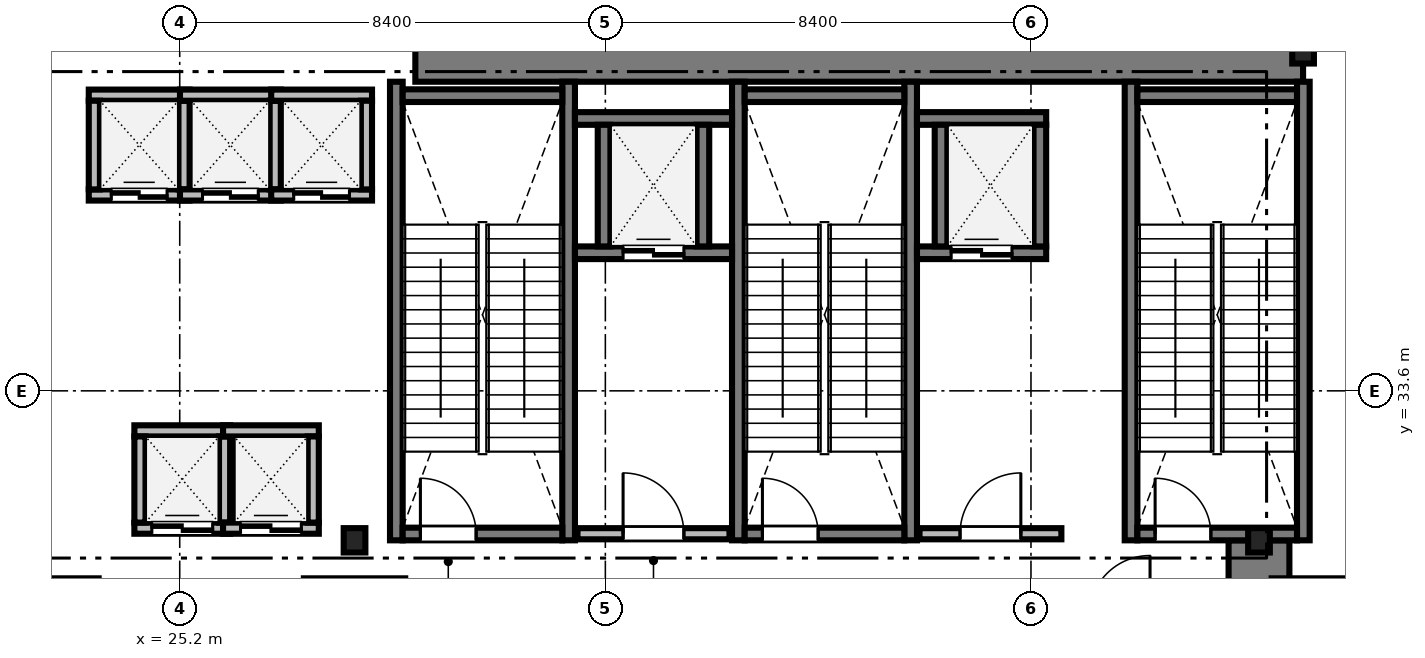
"""IFC4 building model, lengths in metres.
Left out: names, types, materials, properties, quantities, classifications, styles, units other than length and angle.
Written with IfcOpenShell. Run it as: python <this file> out.ifc"""

import sys

from ifc_helpers import new_model, si_unit, direction, frame, frame_2d, origin, origin_2d, place, context, subcontext, project, spatial, rectangle, i_section, extrude, source, transform, mapped, element, fill, save


model = new_model("IFC4")
c1 = context("Model", 3, precision=1e-05, world=origin(), true_north=direction((0.0, 1.0)))
c2 = subcontext(c1, "Body", "Model", "MODEL_VIEW")
j1 = project(units=[si_unit("LENGTHUNIT", "METRE"), si_unit("PLANEANGLEUNIT", "RADIAN")], contexts=[c1])
p1 = place(None, origin())
s1 = spatial("IfcSite", under=j1, at=p1, CompositionType="ELEMENT")
p2 = place(p1, origin())
s2 = spatial("IfcBuilding", under=s1, at=p2, CompositionType="ELEMENT")
p3 = place(p2, origin())
s3 = spatial("IfcBuildingStorey", under=s2, at=p3, CompositionType="ELEMENT", Elevation=0.0)
m1 = source(origin(), c2, "Body", "SweptSolid", [
    extrude(rectangle(XDim=17.52, YDim=1.2, at=frame_2d((8.76, 0.0))), origin(), (0.0, 0.0, 1.0), 5.68),
])
p4 = place(p3, frame((29.85, 40.3, 0.0), z_axis=(0.0, 0.0, 1.0), x_axis=(1.0, 0.0, 0.0)))
e1 = element("IfcWall", 1, at=p4, inside=s3, PredefinedType="SHEAR", context=c2, shape_type="MappedRepresentation", body=[
    mapped(m1, transform((0.0, 0.0, 0.0), scale=1.0)),
])
m2 = source(origin(), c2, "Body", "SweptSolid", [
    extrude(rectangle(XDim=13.15, YDim=1.2, at=frame_2d((6.575, 0.0))), origin(), (0.0, 0.0, 1.0), 5.68),
])
p5 = place(p3, frame((46.5, 17.5, 0.0), z_axis=(0.0, 0.0, 1.0), x_axis=(0.0, 1.0, 0.0)))
e2 = element("IfcWall", 2, at=p5, inside=s3, PredefinedType="SHEAR", context=c2, shape_type="MappedRepresentation", body=[
    mapped(m2, transform((0.0, 0.0, 0.0), scale=1.0)),
])
m3 = source(origin(), c2, "Body", "SweptSolid", [
    extrude(i_section(OverallWidth=0.428, OverallDepth=0.481, WebThickness=0.04, FlangeThickness=0.063, FilletRadius=0.015, at=origin_2d()), origin(), (0.0, 0.0, 1.0), 5.68),
])
for number, where, z_axis, x_axis in (
    (3, (28.65, 30.65, 0.0), (0.0, 0.0, 1.0), (1.0, 0.0, 0.0)),
    (4, (46.5, 30.65, 0.0), (0.0, 0.0, 1.0), (1.0, 0.0, 0.0)),
    (5, (47.37, 40.3, 0.0), (0.0, 0.0, 1.0), (1.0, 0.0, 0.0)),
):
    element("IfcColumn", number, at=place(p3, frame(where, z_axis=z_axis, x_axis=x_axis)), inside=s3, PredefinedType="COLUMN", context=c2, shape_type="MappedRepresentation", body=[
        mapped(m3, transform((0.0, 0.0, 0.0), scale=1.0)),
    ])
m4 = source(origin(), c2, "Body", "SweptSolid", [
    extrude(rectangle(XDim=9.05, YDim=0.25, at=frame_2d((4.525, 0.0))), origin(), (0.0, 0.0, 1.0), 5.8),
])
for number, where, z_axis, x_axis in (
    (6, (29.475, 30.65, 0.0), (0.0, 0.0, 1.0), (0.0, 1.0, 0.0)),
    (7, (32.875, 30.65, 0.0), (0.0, 0.0, 1.0), (0.0, 1.0, 0.0)),
):
    element("IfcWall", number, at=place(p3, frame(where, z_axis=z_axis, x_axis=x_axis)), inside=s3, PredefinedType="SOLIDWALL", context=c2, shape_type="MappedRepresentation", body=[
        mapped(m4, transform((0.0, 0.0, 0.0), scale=1.0)),
    ])
m5 = source(origin(), c2, "Body", "SweptSolid", [
    extrude(rectangle(XDim=3.15, YDim=0.25, at=frame_2d((1.575, 0.0))), origin(), (0.0, 0.0, 1.0), 5.8),
])
p6 = place(p3, frame((29.6, 39.425, 0.0), z_axis=(0.0, 0.0, 1.0), x_axis=(1.0, 0.0, 0.0)))
e8 = element("IfcWall", 8, at=p6, inside=s3, PredefinedType="SOLIDWALL", context=c2, shape_type="MappedRepresentation", body=[
    mapped(m5, transform((0.0, 0.0, 0.0), scale=1.0)),
])
p7 = place(p3, frame((29.6, 30.775, 0.0), z_axis=(0.0, 0.0, 1.0), x_axis=(1.0, 0.0, 0.0)))
e9 = element("IfcWall", 9, at=p7, inside=s3, PredefinedType="SOLIDWALL", context=c2, shape_type="MappedRepresentation", body=[
    mapped(m5, transform((0.0, 0.0, 0.0), scale=1.0)),
])
m6 = source(origin(), c2, "Body", "SweptSolid", [
    extrude(rectangle(XDim=1.1, YDim=2.2, at=frame_2d((0.55, 1.1))), frame((0.0, 0.135, 0.0), z_axis=(0.0, -1.0, 0.0), x_axis=(1.0, 0.0, 0.0)), (0.0, 0.0, 1.0), 0.27),
])
p8 = place(p7, frame((0.35, 0.0, 0.0)))
e10 = element("IfcOpeningElement", 10, at=p8, cuts=e9, PredefinedType="OPENING", context=c2, shape_type="MappedRepresentation", body=[
    mapped(m6, transform((0.0, 0.0, 0.0), scale=1.0)),
])
for number, where, z_axis, x_axis in (
    (11, (36.225, 30.65, 0.0), (0.0, 0.0, 1.0), (0.0, 1.0, 0.0)),
    (12, (39.625, 30.65, 0.0), (0.0, 0.0, 1.0), (0.0, 1.0, 0.0)),
):
    element("IfcWall", number, at=place(p3, frame(where, z_axis=z_axis, x_axis=x_axis)), inside=s3, PredefinedType="SOLIDWALL", context=c2, shape_type="MappedRepresentation", body=[
        mapped(m4, transform((0.0, 0.0, 0.0), scale=1.0)),
    ])
p9 = place(p3, frame((36.35, 39.425, 0.0), z_axis=(0.0, 0.0, 1.0), x_axis=(1.0, 0.0, 0.0)))
e13 = element("IfcWall", 13, at=p9, inside=s3, PredefinedType="SOLIDWALL", context=c2, shape_type="MappedRepresentation", body=[
    mapped(m5, transform((0.0, 0.0, 0.0), scale=1.0)),
])
p10 = place(p3, frame((36.35, 30.775, 0.0), z_axis=(0.0, 0.0, 1.0), x_axis=(1.0, 0.0, 0.0)))
e14 = element("IfcWall", 14, at=p10, inside=s3, PredefinedType="SOLIDWALL", context=c2, shape_type="MappedRepresentation", body=[
    mapped(m5, transform((0.0, 0.0, 0.0), scale=1.0)),
])
p11 = place(p10, frame((0.35, 0.0, 0.0)))
e15 = element("IfcOpeningElement", 15, at=p11, cuts=e14, PredefinedType="OPENING", context=c2, shape_type="MappedRepresentation", body=[
    mapped(m6, transform((0.0, 0.0, 0.0), scale=1.0)),
])
for number, where, z_axis, x_axis in (
    (16, (43.975, 30.65, 0.0), (0.0, 0.0, 1.0), (0.0, 1.0, 0.0)),
    (17, (47.375, 30.65, 0.0), (0.0, 0.0, 1.0), (0.0, 1.0, 0.0)),
):
    element("IfcWall", number, at=place(p3, frame(where, z_axis=z_axis, x_axis=x_axis)), inside=s3, PredefinedType="SOLIDWALL", context=c2, shape_type="MappedRepresentation", body=[
        mapped(m4, transform((0.0, 0.0, 0.0), scale=1.0)),
    ])
p12 = place(p3, frame((44.1, 39.425, 0.0), z_axis=(0.0, 0.0, 1.0), x_axis=(1.0, 0.0, 0.0)))
e18 = element("IfcWall", 18, at=p12, inside=s3, PredefinedType="SOLIDWALL", context=c2, shape_type="MappedRepresentation", body=[
    mapped(m5, transform((0.0, 0.0, 0.0), scale=1.0)),
])
p13 = place(p3, frame((44.1, 30.775, 0.0), z_axis=(0.0, 0.0, 1.0), x_axis=(1.0, 0.0, 0.0)))
e19 = element("IfcWall", 19, at=p13, inside=s3, PredefinedType="SOLIDWALL", context=c2, shape_type="MappedRepresentation", body=[
    mapped(m5, transform((0.0, 0.0, 0.0), scale=1.0)),
])
p14 = place(p13, frame((0.35, 0.0, 0.0)))
e20 = element("IfcOpeningElement", 20, at=p14, cuts=e19, PredefinedType="OPENING", context=c2, shape_type="MappedRepresentation", body=[
    mapped(m6, transform((0.0, 0.0, 0.0), scale=1.0)),
])
m7 = source(origin(), c2, "Body", "SweptSolid", [
    extrude(rectangle(XDim=3.0, YDim=0.22, at=frame_2d((1.5, 0.0))), origin(), (0.0, 0.0, 1.0), 5.68),
])
p15 = place(p3, frame((33.05, 30.78, 0.0), z_axis=(0.0, 0.0, 1.0), x_axis=(1.0, 0.0, 0.0)))
e21 = element("IfcWall", 21, at=p15, inside=s3, PredefinedType="SOLIDWALL", context=c2, shape_type="MappedRepresentation", body=[
    mapped(m7, transform((0.0, 0.0, 0.0), scale=1.0)),
])
m8 = source(origin(), c2, "Body", "SweptSolid", [
    extrude(rectangle(XDim=1.2, YDim=2.2, at=frame_2d((0.6, 1.1))), frame((0.0, 0.12, 0.0), z_axis=(0.0, -1.0, 0.0), x_axis=(1.0, 0.0, 0.0)), (0.0, 0.0, 1.0), 0.24),
])
p16 = place(p15, frame((0.9, 0.0, 0.0)))
e22 = element("IfcOpeningElement", 22, at=p16, cuts=e21, PredefinedType="OPENING", context=c2, shape_type="MappedRepresentation", body=[
    mapped(m8, transform((0.0, 0.0, 0.0), scale=1.0)),
])
m9 = source(origin(), c2, "Body", "SweptSolid", [
    extrude(rectangle(XDim=2.8, YDim=0.22, at=frame_2d((1.4, 0.0))), origin(), (0.0, 0.0, 1.0), 5.68),
])
p17 = place(p3, frame((39.8, 30.78, 0.0), z_axis=(0.0, 0.0, 1.0), x_axis=(1.0, 0.0, 0.0)))
e23 = element("IfcWall", 23, at=p17, inside=s3, PredefinedType="SOLIDWALL", context=c2, shape_type="MappedRepresentation", body=[
    mapped(m9, transform((0.0, 0.0, 0.0), scale=1.0)),
])
p18 = place(p17, frame((0.8, 0.0, 0.0)))
e24 = element("IfcOpeningElement", 24, at=p18, cuts=e23, PredefinedType="OPENING", context=c2, shape_type="MappedRepresentation", body=[
    mapped(m8, transform((0.0, 0.0, 0.0), scale=1.0)),
])
m10 = source(origin(), c2, "Body", "SweptSolid", [
    extrude(rectangle(XDim=1.99, YDim=0.22, at=frame_2d((0.995, 0.0))), origin(), (0.0, 0.0, 1.0), 5.68),
])
p19 = place(p3, frame((23.405, 37.465, 0.0), z_axis=(0.0, 0.0, 1.0), x_axis=(1.0, 0.0, 0.0)))
e25 = element("IfcWall", 25, at=p19, inside=s3, PredefinedType="SOLIDWALL", context=c2, shape_type="MappedRepresentation", body=[
    mapped(m10, transform((0.0, 0.0, 0.0), scale=1.0)),
])
m11 = source(origin(), c2, "Body", "SweptSolid", [
    extrude(rectangle(XDim=1.1, YDim=2.2, at=frame_2d((0.55, 1.1))), frame((0.0, 0.12, 0.0), z_axis=(0.0, -1.0, 0.0), x_axis=(1.0, 0.0, 0.0)), (0.0, 0.0, 1.0), 0.24),
])
p20 = place(p19, frame((0.445, 0.0, 0.0)))
e26 = element("IfcOpeningElement", 26, at=p20, cuts=e25, PredefinedType="OPENING", context=c2, shape_type="MappedRepresentation", body=[
    mapped(m11, transform((0.0, 0.0, 0.0), scale=1.0)),
])
p21 = place(p3, frame((23.405, 39.435, 0.0), z_axis=(0.0, 0.0, 1.0), x_axis=(1.0, 0.0, 0.0)))
e27 = element("IfcWall", 27, at=p21, inside=s3, PredefinedType="SOLIDWALL", context=c2, shape_type="MappedRepresentation", body=[
    mapped(m10, transform((0.0, 0.0, 0.0), scale=1.0)),
])
m12 = source(origin(), c2, "Body", "SweptSolid", [
    extrude(rectangle(XDim=1.75, YDim=0.22, at=frame_2d((0.875, 0.0))), origin(), (0.0, 0.0, 1.0), 5.68),
])
for number, where, z_axis, x_axis in (
    (28, (23.515, 37.575, 0.0), (0.0, 0.0, 1.0), (0.0, 1.0, 0.0)),
    (29, (25.285, 37.575, 0.0), (0.0, 0.0, 1.0), (0.0, 1.0, 0.0)),
):
    element("IfcWall", number, at=place(p3, frame(where, z_axis=z_axis, x_axis=x_axis)), inside=s3, PredefinedType="SOLIDWALL", context=c2, shape_type="MappedRepresentation", body=[
        mapped(m12, transform((0.0, 0.0, 0.0), scale=1.0)),
    ])
p22 = place(p3, frame((25.205, 37.465, 0.0), z_axis=(0.0, 0.0, 1.0), x_axis=(1.0, 0.0, 0.0)))
e30 = element("IfcWall", 30, at=p22, inside=s3, PredefinedType="SOLIDWALL", context=c2, shape_type="MappedRepresentation", body=[
    mapped(m10, transform((0.0, 0.0, 0.0), scale=1.0)),
])
p23 = place(p22, frame((0.445, 0.0, 0.0)))
e31 = element("IfcOpeningElement", 31, at=p23, cuts=e30, PredefinedType="OPENING", context=c2, shape_type="MappedRepresentation", body=[
    mapped(m11, transform((0.0, 0.0, 0.0), scale=1.0)),
])
p24 = place(p3, frame((25.205, 39.435, 0.0), z_axis=(0.0, 0.0, 1.0), x_axis=(1.0, 0.0, 0.0)))
e32 = element("IfcWall", 32, at=p24, inside=s3, PredefinedType="SOLIDWALL", context=c2, shape_type="MappedRepresentation", body=[
    mapped(m10, transform((0.0, 0.0, 0.0), scale=1.0)),
])
p25 = place(p3, frame((27.085, 37.575, 0.0), z_axis=(0.0, 0.0, 1.0), x_axis=(0.0, 1.0, 0.0)))
e33 = element("IfcWall", 33, at=p25, inside=s3, PredefinedType="SOLIDWALL", context=c2, shape_type="MappedRepresentation", body=[
    mapped(m12, transform((0.0, 0.0, 0.0), scale=1.0)),
])
m13 = source(origin(), c2, "Body", "SweptSolid", [
    extrude(rectangle(XDim=1.99, YDim=0.22, at=frame_2d((0.995, 0.0))), origin(), (0.0, 0.0, 1.0), 5.68),
])
p26 = place(p3, frame((27.005, 37.465, 0.0), z_axis=(0.0, 0.0, 1.0), x_axis=(1.0, 0.0, 0.0)))
e34 = element("IfcWall", 34, at=p26, inside=s3, PredefinedType="SOLIDWALL", context=c2, shape_type="MappedRepresentation", body=[
    mapped(m13, transform((0.0, 0.0, 0.0), scale=1.0)),
])
p27 = place(p26, frame((0.445, 0.0, 0.0)))
e35 = element("IfcOpeningElement", 35, at=p27, cuts=e34, PredefinedType="OPENING", context=c2, shape_type="MappedRepresentation", body=[
    mapped(m11, transform((0.0, 0.0, 0.0), scale=1.0)),
])
p28 = place(p3, frame((27.005, 39.435, 0.0), z_axis=(0.0, 0.0, 1.0), x_axis=(1.0, 0.0, 0.0)))
e36 = element("IfcWall", 36, at=p28, inside=s3, PredefinedType="SOLIDWALL", context=c2, shape_type="MappedRepresentation", body=[
    mapped(m13, transform((0.0, 0.0, 0.0), scale=1.0)),
])
p29 = place(p3, frame((28.885, 37.575, 0.0), z_axis=(0.0, 0.0, 1.0), x_axis=(0.0, 1.0, 0.0)))
e37 = element("IfcWall", 37, at=p29, inside=s3, PredefinedType="SOLIDWALL", context=c2, shape_type="MappedRepresentation", body=[
    mapped(m12, transform((0.0, 0.0, 0.0), scale=1.0)),
])
m14 = source(origin(), c2, "Body", "SweptSolid", [
    extrude(rectangle(XDim=3.1, YDim=0.25, at=frame_2d((1.55, 0.0))), origin(), (0.0, 0.0, 1.0), 5.68),
])
p30 = place(p3, frame((33.0, 36.325, 0.0), z_axis=(0.0, 0.0, 1.0), x_axis=(1.0, 0.0, 0.0)))
e38 = element("IfcWall", 38, at=p30, inside=s3, PredefinedType="SOLIDWALL", context=c2, shape_type="MappedRepresentation", body=[
    mapped(m14, transform((0.0, 0.0, 0.0), scale=1.0)),
])
m15 = source(origin(), c2, "Body", "SweptSolid", [
    extrude(rectangle(XDim=1.2, YDim=2.25, at=frame_2d((0.6, 1.125))), frame((0.0, 0.135, 0.0), z_axis=(0.0, -1.0, 0.0), x_axis=(1.0, 0.0, 0.0)), (0.0, 0.0, 1.0), 0.27),
])
p31 = place(p30, frame((0.95, 0.0, 0.0)))
e39 = element("IfcOpeningElement", 39, at=p31, cuts=e38, PredefinedType="OPENING", context=c2, shape_type="MappedRepresentation", body=[
    mapped(m15, transform((0.0, 0.0, 0.0), scale=1.0)),
])
p32 = place(p3, frame((33.0, 38.975, 0.0), z_axis=(0.0, 0.0, 1.0), x_axis=(1.0, 0.0, 0.0)))
e40 = element("IfcWall", 40, at=p32, inside=s3, PredefinedType="SOLIDWALL", context=c2, shape_type="MappedRepresentation", body=[
    mapped(m14, transform((0.0, 0.0, 0.0), scale=1.0)),
])
m16 = source(origin(), c2, "Body", "SweptSolid", [
    extrude(rectangle(XDim=2.4, YDim=0.25, at=frame_2d((1.2, 0.0))), origin(), (0.0, 0.0, 1.0), 5.68),
])
for number, where, z_axis, x_axis in (
    (41, (33.575, 36.45, 0.0), (0.0, 0.0, 1.0), (0.0, 1.0, 0.0)),
    (42, (35.525, 36.45, 0.0), (0.0, 0.0, 1.0), (0.0, 1.0, 0.0)),
):
    element("IfcWall", number, at=place(p3, frame(where, z_axis=z_axis, x_axis=x_axis)), inside=s3, PredefinedType="SOLIDWALL", context=c2, shape_type="MappedRepresentation", body=[
        mapped(m16, transform((0.0, 0.0, 0.0), scale=1.0)),
    ])
m17 = source(origin(), c2, "Body", "SweptSolid", [
    extrude(rectangle(XDim=2.55, YDim=0.25, at=frame_2d((1.275, 0.0))), origin(), (0.0, 0.0, 1.0), 5.68),
])
p33 = place(p3, frame((39.75, 36.325, 0.0), z_axis=(0.0, 0.0, 1.0), x_axis=(1.0, 0.0, 0.0)))
e43 = element("IfcWall", 43, at=p33, inside=s3, PredefinedType="SOLIDWALL", context=c2, shape_type="MappedRepresentation", body=[
    mapped(m17, transform((0.0, 0.0, 0.0), scale=1.0)),
])
p34 = place(p33, frame((0.675, 0.0, 0.0)))
e44 = element("IfcOpeningElement", 44, at=p34, cuts=e43, PredefinedType="OPENING", context=c2, shape_type="MappedRepresentation", body=[
    mapped(m15, transform((0.0, 0.0, 0.0), scale=1.0)),
])
p35 = place(p3, frame((39.75, 38.975, 0.0), z_axis=(0.0, 0.0, 1.0), x_axis=(1.0, 0.0, 0.0)))
e45 = element("IfcWall", 45, at=p35, inside=s3, PredefinedType="SOLIDWALL", context=c2, shape_type="MappedRepresentation", body=[
    mapped(m17, transform((0.0, 0.0, 0.0), scale=1.0)),
])
for number, where, z_axis, x_axis in (
    (46, (40.225, 36.45, 0.0), (0.0, 0.0, 1.0), (0.0, 1.0, 0.0)),
    (47, (42.175, 36.45, 0.0), (0.0, 0.0, 1.0), (0.0, 1.0, 0.0)),
):
    element("IfcWall", number, at=place(p3, frame(where, z_axis=z_axis, x_axis=x_axis)), inside=s3, PredefinedType="SOLIDWALL", context=c2, shape_type="MappedRepresentation", body=[
        mapped(m16, transform((0.0, 0.0, 0.0), scale=1.0)),
    ])
m18 = source(origin(), c2, "Body", "SweptSolid", [
    extrude(rectangle(XDim=1.89, YDim=0.22, at=frame_2d((0.945, 0.0))), origin(), (0.0, 0.0, 1.0), 5.68),
])
p36 = place(p3, frame((24.305, 30.89, 0.0), z_axis=(0.0, 0.0, 1.0), x_axis=(1.0, 0.0, 0.0)))
e48 = element("IfcWall", 48, at=p36, inside=s3, PredefinedType="SOLIDWALL", context=c2, shape_type="MappedRepresentation", body=[
    mapped(m18, transform((0.0, 0.0, 0.0), scale=1.0)),
])
m19 = source(origin(), c2, "Body", "SweptSolid", [
    extrude(rectangle(XDim=1.2, YDim=2.25, at=frame_2d((0.6, 1.125))), frame((0.0, 0.12, 0.0), z_axis=(0.0, -1.0, 0.0), x_axis=(1.0, 0.0, 0.0)), (0.0, 0.0, 1.0), 0.24),
])
p37 = place(p36, frame((0.345, 0.0, 0.0)))
e49 = element("IfcOpeningElement", 49, at=p37, cuts=e48, PredefinedType="OPENING", context=c2, shape_type="MappedRepresentation", body=[
    mapped(m19, transform((0.0, 0.0, 0.0), scale=1.0)),
])
p38 = place(p3, frame((24.305, 32.81, 0.0), z_axis=(0.0, 0.0, 1.0), x_axis=(1.0, 0.0, 0.0)))
e50 = element("IfcWall", 50, at=p38, inside=s3, PredefinedType="SOLIDWALL", context=c2, shape_type="MappedRepresentation", body=[
    mapped(m18, transform((0.0, 0.0, 0.0), scale=1.0)),
])
m20 = source(origin(), c2, "Body", "SweptSolid", [
    extrude(rectangle(XDim=1.7, YDim=0.22, at=frame_2d((0.85, 0.0))), origin(), (0.0, 0.0, 1.0), 5.68),
])
for number, where, z_axis, x_axis in (
    (51, (24.415, 31.0, 0.0), (0.0, 0.0, 1.0), (0.0, 1.0, 0.0)),
    (52, (26.085, 31.0, 0.0), (0.0, 0.0, 1.0), (0.0, 1.0, 0.0)),
):
    element("IfcWall", number, at=place(p3, frame(where, z_axis=z_axis, x_axis=x_axis)), inside=s3, PredefinedType="SOLIDWALL", context=c2, shape_type="MappedRepresentation", body=[
        mapped(m20, transform((0.0, 0.0, 0.0), scale=1.0)),
    ])
p39 = place(p3, frame((26.055, 30.89, 0.0), z_axis=(0.0, 0.0, 1.0), x_axis=(1.0, 0.0, 0.0)))
e53 = element("IfcWall", 53, at=p39, inside=s3, PredefinedType="SOLIDWALL", context=c2, shape_type="MappedRepresentation", body=[
    mapped(m18, transform((0.0, 0.0, 0.0), scale=1.0)),
])
p40 = place(p39, frame((0.345, 0.0, 0.0)))
e54 = element("IfcOpeningElement", 54, at=p40, cuts=e53, PredefinedType="OPENING", context=c2, shape_type="MappedRepresentation", body=[
    mapped(m19, transform((0.0, 0.0, 0.0), scale=1.0)),
])
p41 = place(p3, frame((26.055, 32.81, 0.0), z_axis=(0.0, 0.0, 1.0), x_axis=(1.0, 0.0, 0.0)))
e55 = element("IfcWall", 55, at=p41, inside=s3, PredefinedType="SOLIDWALL", context=c2, shape_type="MappedRepresentation", body=[
    mapped(m18, transform((0.0, 0.0, 0.0), scale=1.0)),
])
p42 = place(p3, frame((27.835, 31.0, 0.0), z_axis=(0.0, 0.0, 1.0), x_axis=(0.0, 1.0, 0.0)))
e56 = element("IfcWall", 56, at=p42, inside=s3, PredefinedType="SOLIDWALL", context=c2, shape_type="MappedRepresentation", body=[
    mapped(m20, transform((0.0, 0.0, 0.0), scale=1.0)),
])
m21 = source(origin(), c2, "Body", "SweptSolid", [
    extrude(rectangle(XDim=1.1, YDim=2.2, at=frame_2d((0.55, 1.1))), frame((0.0, 0.025, 0.0), z_axis=(0.0, -1.0, 0.0), x_axis=(1.0, 0.0, 0.0)), (0.0, 0.0, 1.0), 0.05),
])
p43 = place(p8, origin())
e57 = element("IfcDoor", 57, at=p43, inside=s3, OperationType="SINGLE_SWING_LEFT", PredefinedType="DOOR", context=c2, shape_type="MappedRepresentation", body=[
    mapped(m21, transform((0.0, 0.0, 0.0), scale=1.0)),
])
fill(e10, e57)
p44 = place(p11, origin())
e58 = element("IfcDoor", 58, at=p44, inside=s3, OperationType="SINGLE_SWING_LEFT", PredefinedType="DOOR", context=c2, shape_type="MappedRepresentation", body=[
    mapped(m21, transform((0.0, 0.0, 0.0), scale=1.0)),
])
fill(e15, e58)
p45 = place(p14, origin())
e59 = element("IfcDoor", 59, at=p45, inside=s3, OperationType="SINGLE_SWING_LEFT", PredefinedType="DOOR", context=c2, shape_type="MappedRepresentation", body=[
    mapped(m21, transform((0.0, 0.0, 0.0), scale=1.0)),
])
fill(e20, e59)
m22 = source(origin(), c2, "Body", "SweptSolid", [
    extrude(rectangle(XDim=1.2, YDim=2.2, at=frame_2d((0.6, 1.1))), frame((0.0, 0.025, 0.0), z_axis=(0.0, -1.0, 0.0), x_axis=(1.0, 0.0, 0.0)), (0.0, 0.0, 1.0), 0.05),
])
p46 = place(p16, origin())
e60 = element("IfcDoor", 60, at=p46, inside=s3, OperationType="SINGLE_SWING_LEFT", PredefinedType="DOOR", context=c2, shape_type="MappedRepresentation", body=[
    mapped(m22, transform((0.0, 0.0, 0.0), scale=1.0)),
])
fill(e22, e60)
p47 = place(p18, origin())
e61 = element("IfcDoor", 61, at=p47, inside=s3, OperationType="SINGLE_SWING_RIGHT", PredefinedType="DOOR", context=c2, shape_type="MappedRepresentation", body=[
    mapped(m22, transform((0.0, 0.0, 0.0), scale=1.0)),
])
fill(e24, e61)
p48 = place(p20, origin())
e62 = element("IfcDoor", 62, at=p48, inside=s3, OperationType="DOUBLE_DOOR_SLIDING", PredefinedType="DOOR", context=c2, shape_type="MappedRepresentation", body=[
    mapped(m21, transform((0.0, 0.0, 0.0), scale=1.0)),
])
fill(e26, e62)
p49 = place(p23, origin())
e63 = element("IfcDoor", 63, at=p49, inside=s3, OperationType="DOUBLE_DOOR_SLIDING", PredefinedType="DOOR", context=c2, shape_type="MappedRepresentation", body=[
    mapped(m21, transform((0.0, 0.0, 0.0), scale=1.0)),
])
fill(e31, e63)
p50 = place(p27, origin())
e64 = element("IfcDoor", 64, at=p50, inside=s3, OperationType="DOUBLE_DOOR_SLIDING", PredefinedType="DOOR", context=c2, shape_type="MappedRepresentation", body=[
    mapped(m21, transform((0.0, 0.0, 0.0), scale=1.0)),
])
fill(e35, e64)
m23 = source(origin(), c2, "Body", "SweptSolid", [
    extrude(rectangle(XDim=1.2, YDim=2.25, at=frame_2d((0.6, 1.125))), frame((0.0, 0.025, 0.0), z_axis=(0.0, -1.0, 0.0), x_axis=(1.0, 0.0, 0.0)), (0.0, 0.0, 1.0), 0.05),
])
p51 = place(p31, origin())
e65 = element("IfcDoor", 65, at=p51, inside=s3, OperationType="DOUBLE_DOOR_SLIDING", PredefinedType="DOOR", context=c2, shape_type="MappedRepresentation", body=[
    mapped(m23, transform((0.0, 0.0, 0.0), scale=1.0)),
])
fill(e39, e65)
p52 = place(p34, origin())
e66 = element("IfcDoor", 66, at=p52, inside=s3, OperationType="DOUBLE_DOOR_SLIDING", PredefinedType="DOOR", context=c2, shape_type="MappedRepresentation", body=[
    mapped(m23, transform((0.0, 0.0, 0.0), scale=1.0)),
])
fill(e44, e66)
p53 = place(p37, origin())
e67 = element("IfcDoor", 67, at=p53, inside=s3, OperationType="DOUBLE_DOOR_SLIDING", PredefinedType="DOOR", context=c2, shape_type="MappedRepresentation", body=[
    mapped(m23, transform((0.0, 0.0, 0.0), scale=1.0)),
])
fill(e49, e67)
p54 = place(p40, origin())
e68 = element("IfcDoor", 68, at=p54, inside=s3, OperationType="DOUBLE_DOOR_SLIDING", PredefinedType="DOOR", context=c2, shape_type="MappedRepresentation", body=[
    mapped(m23, transform((0.0, 0.0, 0.0), scale=1.0)),
])
fill(e54, e68)
save(model, sys.argv[1])
